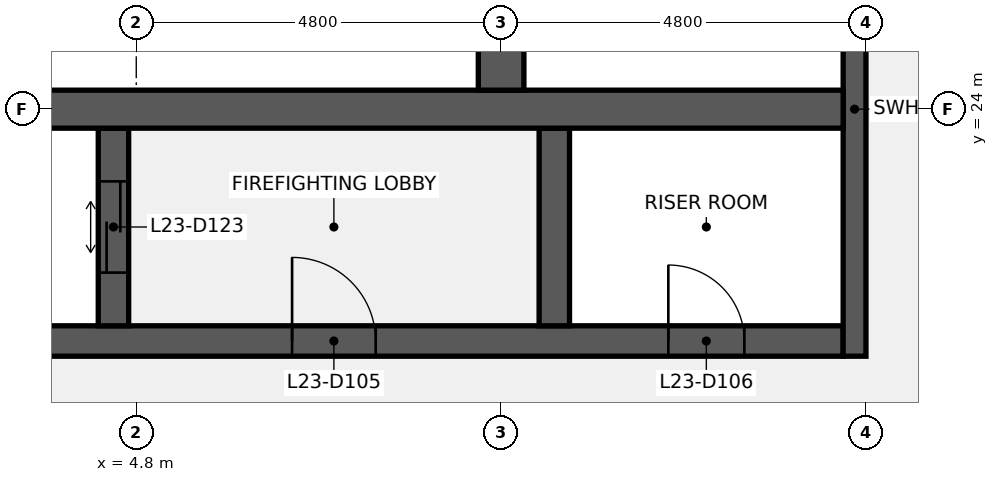
"""IFC4 building model, lengths in metres.
Left out: names, types, materials, properties, quantities, classifications, styles, units other than length and angle.
Written with IfcOpenShell. Run it as: python <this file> out.ifc"""

import sys

from ifc_helpers import new_model, si_unit, direction, frame, frame_2d, origin, place, context, subcontext, project, spatial, rectangle, extrude, element, fill, save


model = new_model("IFC4")
c1 = context("Model", 3, precision=1e-05, world=origin(), true_north=direction((0.0, 1.0)))
c2 = subcontext(c1, "Body", "Model", "MODEL_VIEW")
j1 = project(units=[si_unit("LENGTHUNIT", "METRE"), si_unit("PLANEANGLEUNIT", "RADIAN")], contexts=[c1])
p1 = place(None, origin())
s1 = spatial("IfcSite", under=j1, at=p1, CompositionType="ELEMENT")
p2 = place(p1, origin())
s2 = spatial("IfcBuilding", under=s1, at=p2, CompositionType="ELEMENT")
p3 = place(p2, frame((0.0, 0.0, 112.1)))
s3 = spatial("IfcBuildingStorey", under=s2, at=p3, CompositionType="ELEMENT", Elevation=112.1)
p4 = place(p3, frame((1.0, 20.95, 0.0), z_axis=(0.0, 0.0, 1.0), x_axis=(1.0, 0.0, 0.0)))
e1 = element("IfcWall", 1, at=p4, inside=s3, PredefinedType="SHEAR", context=c2, shape_type="SweptSolid", body=[
    extrude(rectangle(XDim=13.1, YDim=0.4, at=frame_2d((6.55, 0.0))), origin(), (0.0, 0.0, 1.0), 3.84),
])
p5 = place(p4, frame((5.85, 0.0, 0.0)))
e2 = element("IfcOpeningElement", 2, at=p5, cuts=e1, PredefinedType="OPENING", context=c2, shape_type="SweptSolid", body=[
    extrude(rectangle(XDim=1.1, YDim=2.1, at=frame_2d((0.55, 1.05))), frame((0.0, 0.21, 0.0), z_axis=(0.0, -1.0, 0.0), x_axis=(1.0, 0.0, 0.0)), (0.0, 0.0, 1.0), 0.42),
])
p6 = place(p4, frame((10.8, 0.0, 0.0)))
e3 = element("IfcOpeningElement", 3, at=p6, cuts=e1, PredefinedType="OPENING", context=c2, shape_type="SweptSolid", body=[
    extrude(rectangle(XDim=1.0, YDim=2.1, at=frame_2d((0.5, 1.05))), frame((0.0, 0.21, 0.0), z_axis=(0.0, -1.0, 0.0), x_axis=(1.0, 0.0, 0.0)), (0.0, 0.0, 1.0), 0.42),
])
p7 = place(p3, frame((14.25, 20.75, 0.0), z_axis=(0.0, 0.0, 1.0), x_axis=(0.0, 1.0, 0.0)))
e4 = element("IfcWall", 4, at=p7, inside=s3, PredefinedType="SHEAR", context=c2, shape_type="SweptSolid", body=[
    extrude(rectangle(XDim=6.5, YDim=0.3, at=frame_2d((3.25, 0.0))), origin(), (0.0, 0.0, 1.0), 3.84),
])
p8 = place(p3, frame((4.5, 21.15, 0.0), z_axis=(0.0, 0.0, 1.0), x_axis=(0.0, 1.0, 0.0)))
e5 = element("IfcWall", 5, at=p8, inside=s3, PredefinedType="SHEAR", context=c2, shape_type="SweptSolid", body=[
    extrude(rectangle(XDim=2.6, YDim=0.4, at=frame_2d((1.3, 0.0))), origin(), (0.0, 0.0, 1.0), 3.84),
])
p9 = place(p8, frame((0.7, 0.0, 0.0)))
e6 = element("IfcOpeningElement", 6, at=p9, cuts=e5, PredefinedType="OPENING", context=c2, shape_type="SweptSolid", body=[
    extrude(rectangle(XDim=1.2, YDim=2.1, at=frame_2d((0.6, 1.05))), frame((0.0, 0.21, 0.0), z_axis=(0.0, -1.0, 0.0), x_axis=(1.0, 0.0, 0.0)), (0.0, 0.0, 1.0), 0.42),
])
p10 = place(p3, frame((10.3, 21.15, 0.0), z_axis=(0.0, 0.0, 1.0), x_axis=(0.0, 1.0, 0.0)))
e7 = element("IfcWall", 7, at=p10, inside=s3, PredefinedType="SHEAR", context=c2, shape_type="SweptSolid", body=[
    extrude(rectangle(XDim=2.6, YDim=0.4, at=frame_2d((1.3, 0.0))), origin(), (0.0, 0.0, 1.0), 3.84),
])
p11 = place(p3, frame((1.0, 24.0, 0.0), z_axis=(0.0, 0.0, 1.0), x_axis=(1.0, 0.0, 0.0)))
e8 = element("IfcWall", 8, at=p11, inside=s3, PredefinedType="SHEAR", context=c2, shape_type="SweptSolid", body=[
    extrude(rectangle(XDim=13.1, YDim=0.5, at=frame_2d((6.55, 0.0))), origin(), (0.0, 0.0, 1.0), 3.84),
])
p12 = place(p3, frame((9.6, 24.25, 0.0), z_axis=(0.0, 0.0, 1.0), x_axis=(0.0, 1.0, 0.0)))
e9 = element("IfcWall", 9, at=p12, inside=s3, PredefinedType="SHEAR", context=c2, shape_type="SweptSolid", body=[
    extrude(rectangle(XDim=2.6, YDim=0.6, at=frame_2d((1.3, 0.0))), origin(), (0.0, 0.0, 1.0), 3.84),
])
p13 = place(p5, origin())
e10 = element("IfcDoor", 10, at=p13, inside=s3, OperationType="SINGLE_SWING_LEFT", PredefinedType="DOOR", context=c2, shape_type="SweptSolid", body=[
    extrude(rectangle(XDim=1.1, YDim=2.1, at=frame_2d((0.55, 1.05))), frame((0.0, 0.025, 0.0), z_axis=(0.0, -1.0, 0.0), x_axis=(1.0, 0.0, 0.0)), (0.0, 0.0, 1.0), 0.05),
])
fill(e2, e10)
p14 = place(p6, origin())
e11 = element("IfcDoor", 11, at=p14, inside=s3, OperationType="SINGLE_SWING_LEFT", PredefinedType="DOOR", context=c2, shape_type="SweptSolid", body=[
    extrude(rectangle(XDim=1.0, YDim=2.1, at=frame_2d((0.5, 1.05))), frame((0.0, 0.025, 0.0), z_axis=(0.0, -1.0, 0.0), x_axis=(1.0, 0.0, 0.0)), (0.0, 0.0, 1.0), 0.05),
])
fill(e3, e11)
p15 = place(p9, origin())
e12 = element("IfcDoor", 12, at=p15, inside=s3, OperationType="DOUBLE_DOOR_SLIDING", PredefinedType="DOOR", context=c2, shape_type="SweptSolid", body=[
    extrude(rectangle(XDim=1.2, YDim=2.1, at=frame_2d((0.6, 1.05))), frame((0.0, 0.025, 0.0), z_axis=(0.0, -1.0, 0.0), x_axis=(1.0, 0.0, 0.0)), (0.0, 0.0, 1.0), 0.05),
])
fill(e6, e12)
save(model, sys.argv[1])
